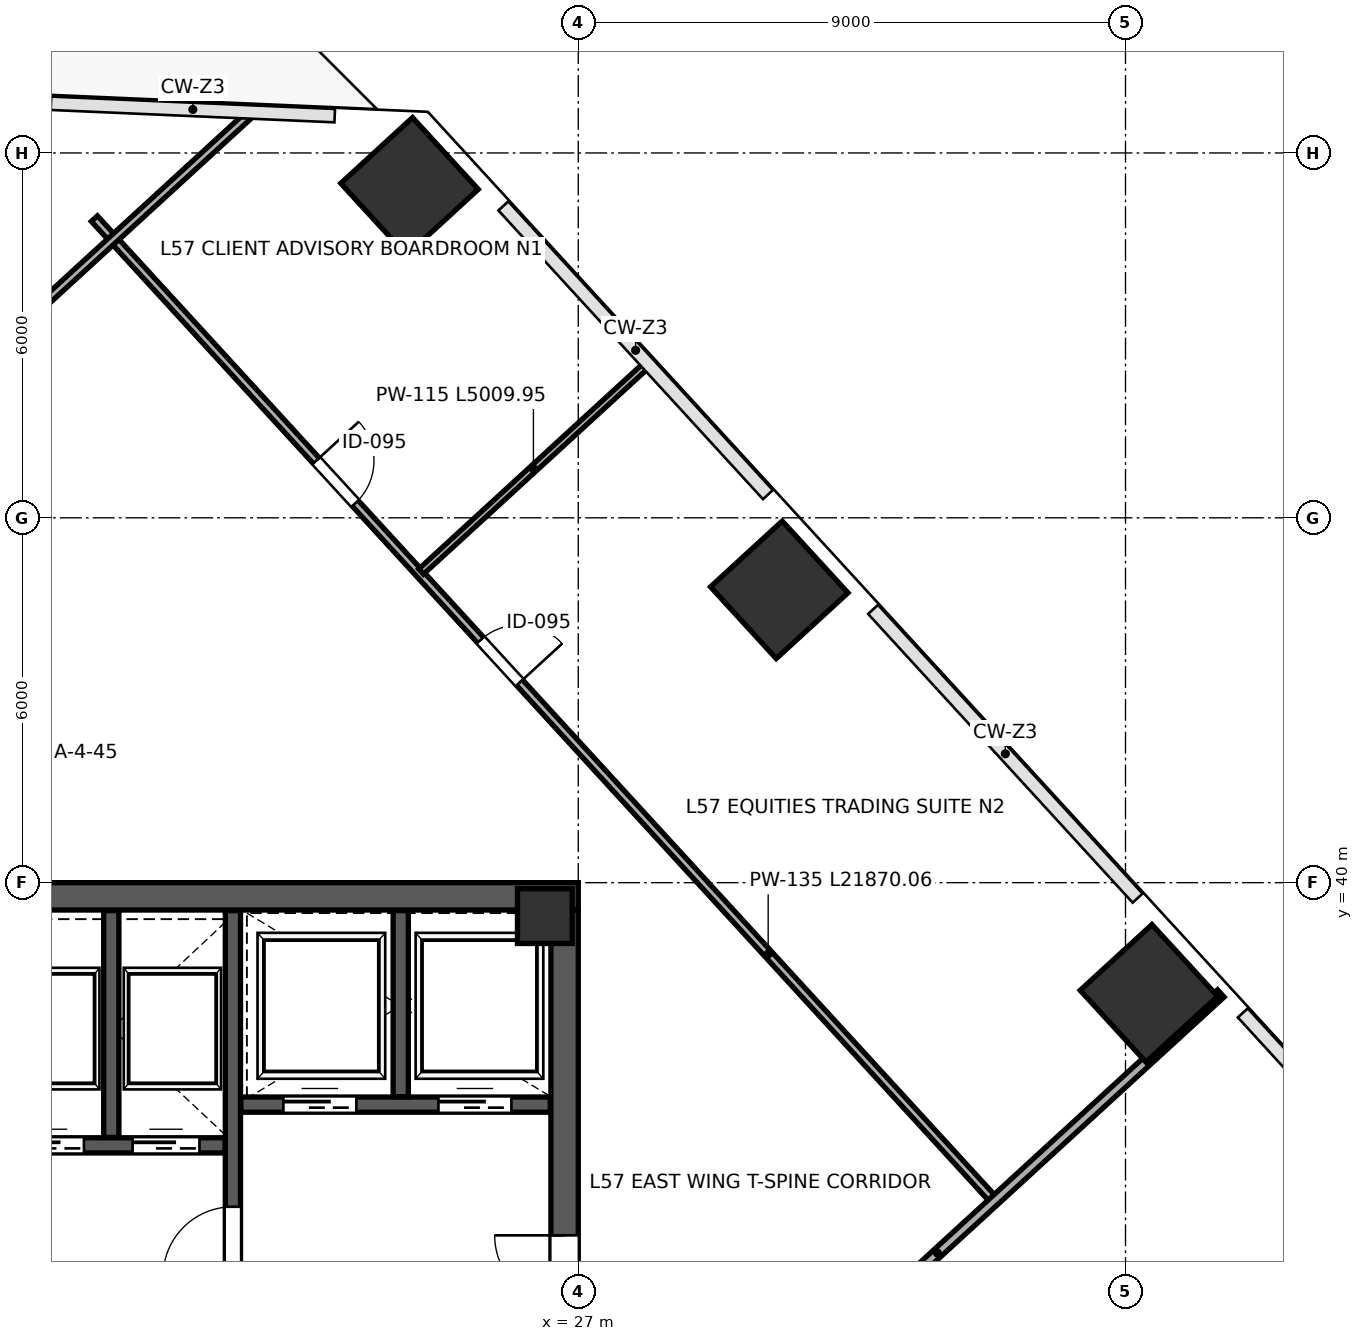
"""IFC4 building model, lengths in metres.
Left out: names, types, materials, properties, quantities, classifications, styles, units other than length and angle.
Written with IfcOpenShell. Run it as: python <this file> out.ifc"""

import sys

from ifc_helpers import new_model, si_unit, direction, frame, frame_2d, origin, origin_2d, place, context, subcontext, project, spatial, rectangle, extrude, source, transform, mapped, element, fill, save


model = new_model("IFC4")
c1 = context("Model", 3, precision=1e-05, world=origin(), true_north=direction((0.0, 1.0)))
c2 = subcontext(c1, "Body", "Model", "MODEL_VIEW")
j1 = project(units=[si_unit("LENGTHUNIT", "METRE"), si_unit("PLANEANGLEUNIT", "RADIAN")], contexts=[c1])
p1 = place(None, origin())
s1 = spatial("IfcSite", under=j1, at=p1, CompositionType="ELEMENT")
p2 = place(p1, origin())
s2 = spatial("IfcBuilding", under=s1, at=p2, CompositionType="ELEMENT")
p3 = place(p2, frame((0.0, 0.0, 254.2)))
s3 = spatial("IfcBuildingStorey", under=s2, at=p3, CompositionType="ELEMENT", Elevation=254.2)
m1 = source(origin(), c2, "Body", "SweptSolid", [
    extrude(rectangle(XDim=0.9, YDim=0.9, at=origin_2d()), origin(), (0.0, 0.0, 1.0), 4.198),
])
p4 = place(p3, frame((26.45, 39.45, 0.001), z_axis=(0.0, 0.0, 1.0), x_axis=(1.0, 0.0, 0.0)))
e1 = element("IfcColumn", 1, at=p4, inside=s3, PredefinedType="COLUMN", context=c2, shape_type="MappedRepresentation", body=[
    mapped(m1, transform((0.0, 0.0, 0.0), scale=1.0)),
])
m2 = source(origin(), c2, "Body", "SweptSolid", [
    extrude(rectangle(XDim=1.6, YDim=1.6, at=origin_2d()), origin(), (0.0, 0.0, 1.0), 4.198),
])
for number, where, z_axis, x_axis in (
    (2, (24.225, 51.451, 0.001), (0.0, 0.0, 1.0), (-0.676, 0.737, 0.0)),
    (3, (30.305, 44.816, 0.001), (0.0, 0.0, 1.0), (-0.676, 0.737, 0.0)),
    (4, (36.385, 38.18, 0.001), (0.0, 0.0, 1.0), (-0.676, 0.737, 0.0)),
):
    element("IfcColumn", number, at=place(p3, frame(where, z_axis=z_axis, x_axis=x_axis)), inside=s3, PredefinedType="COLUMN", context=c2, shape_type="MappedRepresentation", body=[
        mapped(m2, transform((0.0, 0.0, 0.0), scale=1.0)),
    ])
p5 = place(p3, frame((26.775, 24.45, 0.0), z_axis=(0.0, 0.0, 1.0), x_axis=(0.0, 1.0, 0.0)))
e5 = element("IfcWall", 5, at=p5, inside=s3, PredefinedType="SHEAR", context=c2, shape_type="SweptSolid", body=[
    extrude(rectangle(XDim=15.1, YDim=0.45, at=frame_2d((7.55, 0.0))), origin(), (0.0, 0.0, 1.0), 3.96),
])
p6 = place(p5, frame((8.6, 0.0, 0.0)))
e6 = element("IfcOpeningElement", 6, at=p6, cuts=e5, PredefinedType="OPENING", context=c2, shape_type="SweptSolid", body=[
    extrude(rectangle(XDim=1.15, YDim=2.2, at=frame_2d((0.575, 1.1))), frame((0.0, 0.235, 0.0), z_axis=(0.0, -1.0, 0.0), x_axis=(1.0, 0.0, 0.0)), (0.0, 0.0, 1.0), 0.47),
])
p7 = place(p3, frame((9.0, 39.775, 0.0), z_axis=(0.0, 0.0, 1.0), x_axis=(1.0, 0.0, 0.0)))
e7 = element("IfcWall", 7, at=p7, inside=s3, PredefinedType="SHEAR", context=c2, shape_type="SweptSolid", body=[
    extrude(rectangle(XDim=18.0, YDim=0.45, at=frame_2d((9.0, 0.0))), origin(), (0.0, 0.0, 1.0), 3.96),
])
p8 = place(p3, frame((21.32, 32.12, 0.0), z_axis=(0.0, 0.0, 1.0), x_axis=(0.0, 1.0, 0.0)))
e8 = element("IfcWall", 8, at=p8, inside=s3, PredefinedType="SHEAR", context=c2, shape_type="SweptSolid", body=[
    extrude(rectangle(XDim=7.42, YDim=0.25, at=frame_2d((3.71, 0.0))), origin(), (0.0, 0.0, 1.0), 3.96),
])
p9 = place(p8, frame((1.4, 0.0, 0.0)))
e9 = element("IfcOpeningElement", 9, at=p9, cuts=e8, PredefinedType="OPENING", context=c2, shape_type="SweptSolid", body=[
    extrude(rectangle(XDim=1.15, YDim=2.2, at=frame_2d((0.575, 1.1))), frame((0.0, 0.135, 0.0), z_axis=(0.0, -1.0, 0.0), x_axis=(1.0, 0.0, 0.0)), (0.0, 0.0, 1.0), 0.27),
])
p10 = place(p3, frame((21.45, 36.35, 0.0), z_axis=(0.0, 0.0, 1.0), x_axis=(1.0, 0.0, 0.0)))
e10 = element("IfcWall", 10, at=p10, inside=s3, PredefinedType="SHEAR", context=c2, shape_type="SweptSolid", body=[
    extrude(rectangle(XDim=5.09, YDim=0.25, at=frame_2d((2.545, 0.0))), origin(), (0.0, 0.0, 1.0), 3.96),
])
p11 = place(p10, frame((0.7, 0.0, 0.0)))
e11 = element("IfcOpeningElement", 11, at=p11, cuts=e10, PredefinedType="OPENING", context=c2, shape_type="SweptSolid", body=[
    extrude(rectangle(XDim=1.2, YDim=2.2, at=frame_2d((0.6, 1.1))), frame((0.0, 0.135, 0.0), z_axis=(0.0, -1.0, 0.0), x_axis=(1.0, 0.0, 0.0)), (0.0, 0.0, 1.0), 0.27),
])
p12 = place(p10, frame((3.25, 0.0, 0.0)))
e12 = element("IfcOpeningElement", 12, at=p12, cuts=e10, PredefinedType="OPENING", context=c2, shape_type="SweptSolid", body=[
    extrude(rectangle(XDim=1.2, YDim=2.2, at=frame_2d((0.6, 1.1))), frame((0.0, 0.135, 0.0), z_axis=(0.0, -1.0, 0.0), x_axis=(1.0, 0.0, 0.0)), (0.0, 0.0, 1.0), 0.27),
])
p13 = place(p3, frame((24.08, 36.48, 0.0), z_axis=(0.0, 0.0, 1.0), x_axis=(0.0, 1.0, 0.0)))
e13 = element("IfcWall", 13, at=p13, inside=s3, PredefinedType="SHEAR", context=c2, shape_type="SweptSolid", body=[
    extrude(rectangle(XDim=3.06, YDim=0.25, at=frame_2d((1.53, 0.0))), origin(), (0.0, 0.0, 1.0), 3.96),
])
p14 = place(p3, frame((17.32, 35.68, 0.0), z_axis=(0.0, 0.0, 1.0), x_axis=(1.0, 0.0, 0.0)))
e14 = element("IfcWall", 14, at=p14, inside=s3, PredefinedType="SHEAR", context=c2, shape_type="SweptSolid", body=[
    extrude(rectangle(XDim=3.87, YDim=0.25, at=frame_2d((1.935, 0.0))), origin(), (0.0, 0.0, 1.0), 3.96),
])
p15 = place(p14, frame((0.45, 0.0, 0.0)))
e15 = element("IfcOpeningElement", 15, at=p15, cuts=e14, PredefinedType="OPENING", context=c2, shape_type="SweptSolid", body=[
    extrude(rectangle(XDim=1.1, YDim=2.2, at=frame_2d((0.55, 1.1))), frame((0.0, 0.135, 0.0), z_axis=(0.0, -1.0, 0.0), x_axis=(1.0, 0.0, 0.0)), (0.0, 0.0, 1.0), 0.27),
])
p16 = place(p14, frame((2.35, 0.0, 0.0)))
e16 = element("IfcOpeningElement", 16, at=p16, cuts=e14, PredefinedType="OPENING", context=c2, shape_type="SweptSolid", body=[
    extrude(rectangle(XDim=1.1, YDim=2.2, at=frame_2d((0.55, 1.1))), frame((0.0, 0.135, 0.0), z_axis=(0.0, -1.0, 0.0), x_axis=(1.0, 0.0, 0.0)), (0.0, 0.0, 1.0), 0.27),
])
p17 = place(p3, frame((19.32, 35.81, 0.0), z_axis=(0.0, 0.0, 1.0), x_axis=(0.0, 1.0, 0.0)))
e17 = element("IfcWall", 17, at=p17, inside=s3, PredefinedType="SHEAR", context=c2, shape_type="SweptSolid", body=[
    extrude(rectangle(XDim=3.73, YDim=0.25, at=frame_2d((1.865, 0.0))), origin(), (0.0, 0.0, 1.0), 3.96),
])
p18 = place(p3, frame((19.042, 50.92, 0.0), z_axis=(0.0, 0.0, 1.0), x_axis=(0.675589646996, -0.737277850523, 0.0)))
e18 = element("IfcWall", 18, at=p18, inside=s3, PredefinedType="PARTITIONING", context=c2, shape_type="SweptSolid", body=[
    extrude(rectangle(XDim=21.87, YDim=0.135, at=frame_2d((10.935, 0.0))), origin(), (0.0, 0.0, 1.0), 3.96),
])
p19 = place(p18, frame((5.4, 0.0, 0.0)))
e19 = element("IfcOpeningElement", 19, at=p19, cuts=e18, PredefinedType="OPENING", context=c2, shape_type="SweptSolid", body=[
    extrude(rectangle(XDim=0.95, YDim=2.15, at=frame_2d((0.475, 1.075))), frame((0.0, 0.078, 0.0), z_axis=(0.0, -1.0, 0.0), x_axis=(1.0, 0.0, 0.0)), (0.0, 0.0, 1.0), 0.155),
])
p20 = place(p18, frame((9.4, 0.0, 0.0)))
e20 = element("IfcOpeningElement", 20, at=p20, cuts=e18, PredefinedType="OPENING", context=c2, shape_type="SweptSolid", body=[
    extrude(rectangle(XDim=0.95, YDim=2.15, at=frame_2d((0.475, 1.075))), frame((0.0, 0.078, 0.0), z_axis=(0.0, -1.0, 0.0), x_axis=(1.0, 0.0, 0.0)), (0.0, 0.0, 1.0), 0.155),
])
p21 = place(p3, frame((24.415, 45.115, 0.0), z_axis=(0.0, 0.0, 1.0), x_axis=(0.737279537385, 0.675587806101, 0.0)))
e21 = element("IfcWall", 21, at=p21, inside=s3, PredefinedType="PARTITIONING", context=c2, shape_type="SweptSolid", body=[
    extrude(rectangle(XDim=5.01, YDim=0.115, at=frame_2d((2.505, 0.0))), origin(), (0.0, 0.0, 1.0), 3.295),
])
p22 = place(p3, frame((1.393, 34.124, 0.0), z_axis=(0.0, 0.0, 1.0), x_axis=(0.737274323436, 0.675593496121, 0.0)))
e22 = element("IfcWall", 22, at=p22, inside=s3, PredefinedType="PARTITIONING", context=c2, shape_type="SweptSolid", body=[
    extrude(rectangle(XDim=27.402, YDim=0.135, at=frame_2d((13.701, 0.0))), origin(), (0.0, 0.0, 1.0), 3.96),
])
p23 = place(p3, frame((28.248, 29.639, 0.0), z_axis=(0.0, 0.0, 1.0), x_axis=(0.73728000412, 0.675587296746, 0.0)))
e23 = element("IfcWall", 23, at=p23, inside=s3, PredefinedType="PARTITIONING", context=c2, shape_type="SweptSolid", body=[
    extrude(rectangle(XDim=12.64, YDim=0.16, at=frame_2d((6.32, 0.0))), origin(), (0.0, 0.0, 1.0), 3.295),
])
m3 = source(origin(), c2, "Body", "SweptSolid", [
    extrude(rectangle(XDim=1.15, YDim=2.2, at=frame_2d((0.575, 1.1))), frame((0.0, 0.025, 0.0), z_axis=(0.0, -1.0, 0.0), x_axis=(1.0, 0.0, 0.0)), (0.0, 0.0, 1.0), 0.05),
])
p24 = place(p9, origin())
e24 = element("IfcDoor", 24, at=p24, inside=s3, OperationType="SINGLE_SWING_LEFT", PredefinedType="DOOR", context=c2, shape_type="MappedRepresentation", body=[
    mapped(m3, transform((0.0, 0.0, 0.0), scale=1.0)),
])
fill(e9, e24)
p25 = place(p6, origin())
e25 = element("IfcDoor", 25, at=p25, inside=s3, OperationType="SINGLE_SWING_RIGHT", PredefinedType="DOOR", context=c2, shape_type="MappedRepresentation", body=[
    mapped(m3, transform((0.0, 0.0, 0.0), scale=1.0)),
])
fill(e6, e25)
m4 = source(origin(), c2, "Body", "SweptSolid", [
    extrude(rectangle(XDim=1.1, YDim=2.2, at=frame_2d((0.55, 1.1))), frame((0.0, 0.025, 0.0), z_axis=(0.0, -1.0, 0.0), x_axis=(1.0, 0.0, 0.0)), (0.0, 0.0, 1.0), 0.05),
])
p26 = place(p15, origin())
e26 = element("IfcDoor", 26, at=p26, inside=s3, OperationType="SLIDING_TO_LEFT", PredefinedType="DOOR", context=c2, shape_type="MappedRepresentation", body=[
    mapped(m4, transform((0.0, 0.0, 0.0), scale=1.0)),
])
fill(e15, e26)
p27 = place(p16, origin())
e27 = element("IfcDoor", 27, at=p27, inside=s3, OperationType="SLIDING_TO_RIGHT", PredefinedType="DOOR", context=c2, shape_type="MappedRepresentation", body=[
    mapped(m4, transform((0.0, 0.0, 0.0), scale=1.0)),
])
fill(e16, e27)
m5 = source(origin(), c2, "Body", "SweptSolid", [
    extrude(rectangle(XDim=1.2, YDim=2.2, at=frame_2d((0.6, 1.1))), frame((0.0, 0.025, 0.0), z_axis=(0.0, -1.0, 0.0), x_axis=(1.0, 0.0, 0.0)), (0.0, 0.0, 1.0), 0.05),
])
p28 = place(p11, origin())
e28 = element("IfcDoor", 28, at=p28, inside=s3, OperationType="SLIDING_TO_LEFT", PredefinedType="DOOR", context=c2, shape_type="MappedRepresentation", body=[
    mapped(m5, transform((0.0, 0.0, 0.0), scale=1.0)),
])
fill(e11, e28)
p29 = place(p12, origin())
e29 = element("IfcDoor", 29, at=p29, inside=s3, OperationType="SLIDING_TO_RIGHT", PredefinedType="DOOR", context=c2, shape_type="MappedRepresentation", body=[
    mapped(m5, transform((0.0, 0.0, 0.0), scale=1.0)),
])
fill(e12, e29)
m6 = source(origin(), c2, "Body", "SweptSolid", [
    extrude(rectangle(XDim=0.95, YDim=2.15, at=frame_2d((0.475, 1.075))), frame((0.0, 0.025, 0.0), z_axis=(0.0, -1.0, 0.0), x_axis=(1.0, 0.0, 0.0)), (0.0, 0.0, 1.0), 0.05),
])
p30 = place(p19, origin())
e30 = element("IfcDoor", 30, at=p30, inside=s3, OperationType="SINGLE_SWING_LEFT", PredefinedType="DOOR", context=c2, shape_type="MappedRepresentation", body=[
    mapped(m6, transform((0.0, 0.0, 0.0), scale=1.0)),
])
fill(e19, e30)
p31 = place(p20, origin())
e31 = element("IfcDoor", 31, at=p31, inside=s3, OperationType="SINGLE_SWING_RIGHT", PredefinedType="DOOR", context=c2, shape_type="MappedRepresentation", body=[
    mapped(m6, transform((0.0, 0.0, 0.0), scale=1.0)),
])
fill(e20, e31)
save(model, sys.argv[1])
